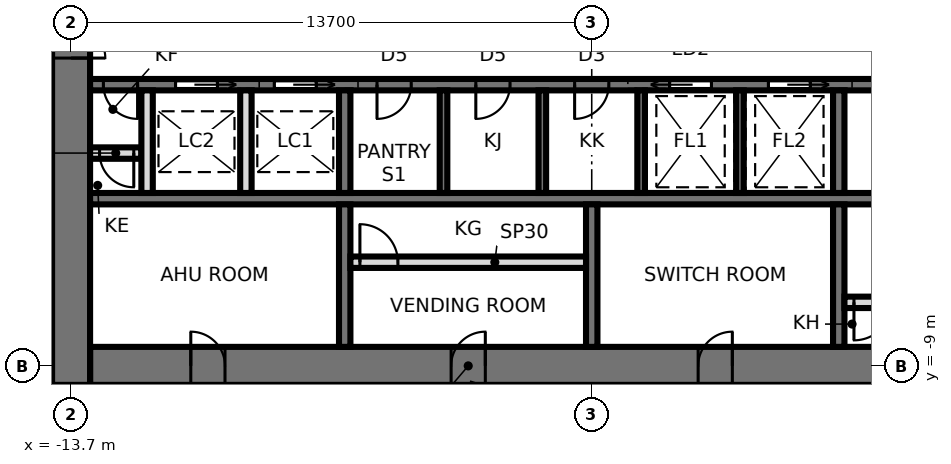
"""IFC4 building model, lengths in metres.
Left out: names, types, materials, properties, quantities, classifications, styles, units other than length and angle.
Written with IfcOpenShell. Run it as: python <this file> out.ifc"""

import sys

from ifc_helpers import new_model, si_unit, direction, frame, frame_2d, origin, place, context, subcontext, project, spatial, rectangle, extrude, element, fill, save


model = new_model("IFC4")
c1 = context("Model", 3, precision=1e-05, world=origin(), true_north=direction((0.0, 1.0)))
c2 = subcontext(c1, "Body", "Model", "MODEL_VIEW")
j1 = project(units=[si_unit("LENGTHUNIT", "METRE"), si_unit("PLANEANGLEUNIT", "RADIAN")], contexts=[c1])
p1 = place(None, origin())
s1 = spatial("IfcSite", under=j1, at=p1, CompositionType="ELEMENT")
p2 = place(p1, origin())
s2 = spatial("IfcBuilding", under=s1, at=p2, CompositionType="ELEMENT")
p3 = place(p2, frame((0.0, 0.0, 234.5)))
s3 = spatial("IfcBuildingStorey", under=s2, at=p3, CompositionType="ELEMENT", Elevation=234.5)
p4 = place(p3, frame((-13.2, -9.0, 0.0), z_axis=(0.0, 0.0, 1.0), x_axis=(1.0, 0.0, 0.0)))
e1 = element("IfcWall", 1, at=p4, inside=s3, PredefinedType="SHEAR", context=c2, shape_type="SweptSolid", body=[
    extrude(rectangle(XDim=26.4, YDim=1.0, at=frame_2d((13.2, 0.0))), origin(), (0.0, 0.0, 1.0), 3.9),
])
p5 = place(p4, frame((2.65, 0.0, 0.0)))
e2 = element("IfcOpeningElement", 2, at=p5, cuts=e1, PredefinedType="OPENING", context=c2, shape_type="SweptSolid", body=[
    extrude(rectangle(XDim=0.9, YDim=2.1, at=frame_2d((0.45, 1.05))), frame((0.0, 0.51, 0.0), z_axis=(0.0, -1.0, 0.0), x_axis=(1.0, 0.0, 0.0)), (0.0, 0.0, 1.0), 1.02),
])
p6 = place(p4, frame((9.5, 0.0, 0.0)))
e3 = element("IfcOpeningElement", 3, at=p6, cuts=e1, PredefinedType="OPENING", context=c2, shape_type="SweptSolid", body=[
    extrude(rectangle(XDim=0.9, YDim=2.1, at=frame_2d((0.45, 1.05))), frame((0.0, 0.51, 0.0), z_axis=(0.0, -1.0, 0.0), x_axis=(1.0, 0.0, 0.0)), (0.0, 0.0, 1.0), 1.02),
])
p7 = place(p4, frame((16.0, 0.0, 0.0)))
e4 = element("IfcOpeningElement", 4, at=p7, cuts=e1, PredefinedType="OPENING", context=c2, shape_type="SweptSolid", body=[
    extrude(rectangle(XDim=0.9, YDim=2.1, at=frame_2d((0.45, 1.05))), frame((0.0, 0.51, 0.0), z_axis=(0.0, -1.0, 0.0), x_axis=(1.0, 0.0, 0.0)), (0.0, 0.0, 1.0), 1.02),
])
p8 = place(p4, frame((22.85, 0.0, 0.0)))
e5 = element("IfcOpeningElement", 5, at=p8, cuts=e1, PredefinedType="OPENING", context=c2, shape_type="SweptSolid", body=[
    extrude(rectangle(XDim=0.9, YDim=2.1, at=frame_2d((0.45, 1.05))), frame((0.0, 0.51, 0.0), z_axis=(0.0, -1.0, 0.0), x_axis=(1.0, 0.0, 0.0)), (0.0, 0.0, 1.0), 1.02),
])
p9 = place(p3, frame((-13.7, 9.5, 0.0), z_axis=(0.0, 0.0, 1.0), x_axis=(0.0, -1.0, 0.0)))
e6 = element("IfcWall", 6, at=p9, inside=s3, PredefinedType="SHEAR", context=c2, shape_type="SweptSolid", body=[
    extrude(rectangle(XDim=19.0, YDim=1.0, at=frame_2d((9.5, 0.0))), origin(), (0.0, 0.0, 1.0), 3.9),
])
p10 = place(p9, frame((8.6, 0.0, 0.0)))
e7 = element("IfcOpeningElement", 7, at=p10, cuts=e6, PredefinedType="OPENING", context=c2, shape_type="SweptSolid", body=[
    extrude(rectangle(XDim=1.8, YDim=2.4, at=frame_2d((0.9, 1.2))), frame((0.0, 0.51, 0.0), z_axis=(0.0, -1.0, 0.0), x_axis=(1.0, 0.0, 0.0)), (0.0, 0.0, 1.0), 1.02),
])
p11 = place(p3, frame((-13.2, -1.6, 0.0), z_axis=(0.0, 0.0, 1.0), x_axis=(1.0, 0.0, 0.0)))
e8 = element("IfcWall", 8, at=p11, inside=s3, PredefinedType="SHEAR", context=c2, shape_type="SweptSolid", body=[
    extrude(rectangle(XDim=26.4, YDim=0.3, at=frame_2d((13.2, 0.0))), origin(), (0.0, 0.0, 1.0), 3.9),
])
p12 = place(p11, frame((25.15, 0.0, 0.0)))
e9 = element("IfcOpeningElement", 9, at=p12, cuts=e8, PredefinedType="OPENING", context=c2, shape_type="SweptSolid", body=[
    extrude(rectangle(XDim=1.0, YDim=2.1, at=frame_2d((0.5, 1.05))), frame((0.0, 0.16, 0.0), z_axis=(0.0, -1.0, 0.0), x_axis=(1.0, 0.0, 0.0)), (0.0, 0.0, 1.0), 0.32),
])
p13 = place(p11, frame((7.55, 0.0, 0.0)))
e10 = element("IfcOpeningElement", 10, at=p13, cuts=e8, PredefinedType="OPENING", context=c2, shape_type="SweptSolid", body=[
    extrude(rectangle(XDim=0.9, YDim=2.1, at=frame_2d((0.45, 1.05))), frame((0.0, 0.16, 0.0), z_axis=(0.0, -1.0, 0.0), x_axis=(1.0, 0.0, 0.0)), (0.0, 0.0, 1.0), 0.32),
])
p14 = place(p11, frame((10.15, 0.0, 0.0)))
e11 = element("IfcOpeningElement", 11, at=p14, cuts=e8, PredefinedType="OPENING", context=c2, shape_type="SweptSolid", body=[
    extrude(rectangle(XDim=0.9, YDim=2.1, at=frame_2d((0.45, 1.05))), frame((0.0, 0.16, 0.0), z_axis=(0.0, -1.0, 0.0), x_axis=(1.0, 0.0, 0.0)), (0.0, 0.0, 1.0), 0.32),
])
p15 = place(p11, frame((12.75, 0.0, 0.0)))
e12 = element("IfcOpeningElement", 12, at=p15, cuts=e8, PredefinedType="OPENING", context=c2, shape_type="SweptSolid", body=[
    extrude(rectangle(XDim=0.9, YDim=2.1, at=frame_2d((0.45, 1.05))), frame((0.0, 0.16, 0.0), z_axis=(0.0, -1.0, 0.0), x_axis=(1.0, 0.0, 0.0)), (0.0, 0.0, 1.0), 0.32),
])
p16 = place(p11, frame((15.25, 0.0, 0.0)))
e13 = element("IfcOpeningElement", 13, at=p16, cuts=e8, PredefinedType="OPENING", context=c2, shape_type="SweptSolid", body=[
    extrude(rectangle(XDim=1.1, YDim=2.3, at=frame_2d((0.55, 1.15))), frame((0.0, 0.16, 0.0), z_axis=(0.0, -1.0, 0.0), x_axis=(1.0, 0.0, 0.0)), (0.0, 0.0, 1.0), 0.32),
])
p17 = place(p11, frame((17.85, 0.0, 0.0)))
e14 = element("IfcOpeningElement", 14, at=p17, cuts=e8, PredefinedType="OPENING", context=c2, shape_type="SweptSolid", body=[
    extrude(rectangle(XDim=1.1, YDim=2.3, at=frame_2d((0.55, 1.15))), frame((0.0, 0.16, 0.0), z_axis=(0.0, -1.0, 0.0), x_axis=(1.0, 0.0, 0.0)), (0.0, 0.0, 1.0), 0.32),
])
p18 = place(p11, frame((4.85, 0.0, 0.0)))
e15 = element("IfcOpeningElement", 15, at=p18, cuts=e8, PredefinedType="OPENING", context=c2, shape_type="SweptSolid", body=[
    extrude(rectangle(XDim=1.1, YDim=2.3, at=frame_2d((0.55, 1.15))), frame((0.0, 0.16, 0.0), z_axis=(0.0, -1.0, 0.0), x_axis=(1.0, 0.0, 0.0)), (0.0, 0.0, 1.0), 0.32),
])
p19 = place(p11, frame((2.25, 0.0, 0.0)))
e16 = element("IfcOpeningElement", 16, at=p19, cuts=e8, PredefinedType="OPENING", context=c2, shape_type="SweptSolid", body=[
    extrude(rectangle(XDim=1.1, YDim=2.3, at=frame_2d((0.55, 1.15))), frame((0.0, 0.16, 0.0), z_axis=(0.0, -1.0, 0.0), x_axis=(1.0, 0.0, 0.0)), (0.0, 0.0, 1.0), 0.32),
])
p20 = place(p11, frame((0.35, 0.0, 0.0)))
e17 = element("IfcOpeningElement", 17, at=p20, cuts=e8, PredefinedType="OPENING", context=c2, shape_type="SweptSolid", body=[
    extrude(rectangle(XDim=0.9, YDim=2.1, at=frame_2d((0.45, 1.05))), frame((0.0, 0.16, 0.0), z_axis=(0.0, -1.0, 0.0), x_axis=(1.0, 0.0, 0.0)), (0.0, 0.0, 1.0), 0.32),
])
p21 = place(p3, frame((-13.2, -4.6, 0.0), z_axis=(0.0, 0.0, 1.0), x_axis=(1.0, 0.0, 0.0)))
e18 = element("IfcWall", 18, at=p21, inside=s3, PredefinedType="SHEAR", context=c2, shape_type="SweptSolid", body=[
    extrude(rectangle(XDim=26.4, YDim=0.3, at=frame_2d((13.2, 0.0))), origin(), (0.0, 0.0, 1.0), 3.9),
])
p22 = place(p3, frame((-6.5, -1.75, 0.0), z_axis=(0.0, 0.0, 1.0), x_axis=(0.0, -1.0, 0.0)))
e19 = element("IfcWall", 19, at=p22, inside=s3, PredefinedType="SHEAR", context=c2, shape_type="SweptSolid", body=[
    extrude(rectangle(XDim=2.7, YDim=0.3, at=frame_2d((1.35, 0.0))), origin(), (0.0, 0.0, 1.0), 3.9),
])
p23 = place(p3, frame((-6.5, -4.75, 0.0), z_axis=(0.0, 0.0, 1.0), x_axis=(0.0, -1.0, 0.0)))
e20 = element("IfcWall", 20, at=p23, inside=s3, PredefinedType="SHEAR", context=c2, shape_type="SweptSolid", body=[
    extrude(rectangle(XDim=3.75, YDim=0.3, at=frame_2d((1.875, 0.0))), origin(), (0.0, 0.0, 1.0), 3.9),
])
p24 = place(p3, frame((6.5, -1.75, 0.0), z_axis=(0.0, 0.0, 1.0), x_axis=(0.0, -1.0, 0.0)))
e21 = element("IfcWall", 21, at=p24, inside=s3, PredefinedType="SHEAR", context=c2, shape_type="SweptSolid", body=[
    extrude(rectangle(XDim=2.7, YDim=0.3, at=frame_2d((1.35, 0.0))), origin(), (0.0, 0.0, 1.0), 3.9),
])
p25 = place(p3, frame((6.5, -4.75, 0.0), z_axis=(0.0, 0.0, 1.0), x_axis=(0.0, -1.0, 0.0)))
e22 = element("IfcWall", 22, at=p25, inside=s3, PredefinedType="SHEAR", context=c2, shape_type="SweptSolid", body=[
    extrude(rectangle(XDim=3.75, YDim=0.3, at=frame_2d((1.875, 0.0))), origin(), (0.0, 0.0, 1.0), 3.9),
])
for number, where, z_axis, x_axis in (
    (23, (-3.9, -1.75, 0.0), (0.0, 0.0, 1.0), (0.0, -1.0, 0.0)),
    (24, (-1.3, -1.75, 0.0), (0.0, 0.0, 1.0), (0.0, -1.0, 0.0)),
    (25, (1.3, -1.75, 0.0), (0.0, 0.0, 1.0), (0.0, -1.0, 0.0)),
    (26, (3.9, -1.75, 0.0), (0.0, 0.0, 1.0), (0.0, -1.0, 0.0)),
):
    element("IfcWall", number, at=place(p3, frame(where, z_axis=z_axis, x_axis=x_axis)), inside=s3, PredefinedType="SHEAR", context=c2, shape_type="SweptSolid", body=[
        extrude(rectangle(XDim=2.7, YDim=0.2, at=frame_2d((1.35, 0.0))), origin(), (0.0, 0.0, 1.0), 3.9),
    ])
p26 = place(p3, frame((0.0, -4.75, 0.0), z_axis=(0.0, 0.0, 1.0), x_axis=(0.0, -1.0, 0.0)))
e27 = element("IfcWall", 27, at=p26, inside=s3, PredefinedType="SHEAR", context=c2, shape_type="SweptSolid", body=[
    extrude(rectangle(XDim=3.75, YDim=0.3, at=frame_2d((1.875, 0.0))), origin(), (0.0, 0.0, 1.0), 3.9),
])
p27 = place(p3, frame((-6.35, -6.272, 0.0), z_axis=(0.0, 0.0, 1.0), x_axis=(1.0, 0.0, 0.0)))
e28 = element("IfcWall", 28, at=p27, inside=s3, PredefinedType="PARTITIONING", context=c2, shape_type="SweptSolid", body=[
    extrude(rectangle(XDim=6.2, YDim=0.3, at=frame_2d((3.1, 0.0))), origin(), (0.0, 0.0, 1.0), 3.74),
])
p28 = place(p27, frame((0.25, 0.0, 0.0)))
e29 = element("IfcOpeningElement", 29, at=p28, cuts=e28, PredefinedType="OPENING", context=c2, shape_type="SweptSolid", body=[
    extrude(rectangle(XDim=1.0, YDim=2.4, at=frame_2d((0.5, 1.2))), frame((0.0, 0.16, 0.0), z_axis=(0.0, -1.0, 0.0), x_axis=(1.0, 0.0, 0.0)), (0.0, 0.0, 1.0), 0.32),
])
p29 = place(p3, frame((6.65, -7.328, 0.0), z_axis=(0.0, 0.0, 1.0), x_axis=(1.0, 0.0, 0.0)))
e30 = element("IfcWall", 30, at=p29, inside=s3, PredefinedType="PARTITIONING", context=c2, shape_type="SweptSolid", body=[
    extrude(rectangle(XDim=6.55, YDim=0.3, at=frame_2d((3.275, 0.0))), origin(), (0.0, 0.0, 1.0), 3.74),
])
p30 = place(p29, frame((0.25, 0.0, 0.0)))
e31 = element("IfcOpeningElement", 31, at=p30, cuts=e30, PredefinedType="OPENING", context=c2, shape_type="SweptSolid", body=[
    extrude(rectangle(XDim=1.0, YDim=2.4, at=frame_2d((0.5, 1.2))), frame((0.0, 0.16, 0.0), z_axis=(0.0, -1.0, 0.0), x_axis=(1.0, 0.0, 0.0)), (0.0, 0.0, 1.0), 0.32),
])
p31 = place(p3, frame((-13.2, -3.4, 0.0), z_axis=(0.0, 0.0, 1.0), x_axis=(1.0, 0.0, 0.0)))
e32 = element("IfcWall", 32, at=p31, inside=s3, PredefinedType="SOLIDWALL", context=c2, shape_type="SweptSolid", body=[
    extrude(rectangle(XDim=1.35, YDim=0.3, at=frame_2d((0.675, 0.0))), origin(), (0.0, 0.0, 1.0), 3.74),
])
p32 = place(p31, frame((0.25, 0.0, 0.0)))
e33 = element("IfcOpeningElement", 33, at=p32, cuts=e32, PredefinedType="OPENING", context=c2, shape_type="SweptSolid", body=[
    extrude(rectangle(XDim=0.9, YDim=2.1, at=frame_2d((0.45, 1.05))), frame((0.0, 0.16, 0.0), z_axis=(0.0, -1.0, 0.0), x_axis=(1.0, 0.0, 0.0)), (0.0, 0.0, 1.0), 0.32),
])
for number, where, z_axis, x_axis in (
    (34, (-9.1, -1.75, 0.0), (0.0, 0.0, 1.0), (0.0, -1.0, 0.0)),
    (35, (-11.7, -1.75, 0.0), (0.0, 0.0, 1.0), (0.0, -1.0, 0.0)),
):
    element("IfcWall", number, at=place(p3, frame(where, z_axis=z_axis, x_axis=x_axis)), inside=s3, PredefinedType="SOLIDWALL", context=c2, shape_type="SweptSolid", body=[
        extrude(rectangle(XDim=2.7, YDim=0.3, at=frame_2d((1.35, 0.0))), origin(), (0.0, 0.0, 1.0), 3.74),
    ])
p33 = place(p3, frame((-3.672, -11.3, 0.0), z_axis=(0.0, 0.0, 1.0), x_axis=(0.309059822154, 0.95104259964, 0.0)))
e36 = element("IfcWall", 36, at=p33, inside=s3, PredefinedType="PARTITIONING", context=c2, shape_type="SweptSolid", body=[
    extrude(rectangle(XDim=1.893, YDim=0.12, at=frame_2d((0.946, 0.0))), origin(), (0.0, 0.0, 1.0), 3.04),
])
p34 = place(p10, origin())
e37 = element("IfcDoor", 37, at=p34, inside=s3, OperationType="DOUBLE_DOOR_SINGLE_SWING", PredefinedType="DOOR", context=c2, shape_type="SweptSolid", body=[
    extrude(rectangle(XDim=1.72, YDim=2.36, at=frame_2d((0.9, 1.18))), frame((0.0, 0.025, 0.0), z_axis=(0.0, -1.0, 0.0), x_axis=(1.0, 0.0, 0.0)), (0.0, 0.0, 1.0), 0.05),
    extrude(rectangle(XDim=0.04, YDim=2.4, at=frame_2d((0.02, 1.2))), frame((0.0, 0.25, 0.0), z_axis=(0.0, -1.0, 0.0), x_axis=(1.0, 0.0, 0.0)), (0.0, 0.0, 1.0), 0.5),
    extrude(rectangle(XDim=0.04, YDim=2.4, at=frame_2d((1.78, 1.2))), frame((0.0, 0.25, 0.0), z_axis=(0.0, -1.0, 0.0), x_axis=(1.0, 0.0, 0.0)), (0.0, 0.0, 1.0), 0.5),
    extrude(rectangle(XDim=1.72, YDim=0.04, at=frame_2d((0.9, 2.38))), frame((0.0, 0.25, 0.0), z_axis=(0.0, -1.0, 0.0), x_axis=(1.0, 0.0, 0.0)), (0.0, 0.0, 1.0), 0.5),
])
fill(e7, e37)
p35 = place(p13, frame((0.9, 0.0, 0.0), z_axis=(0.0, 0.0, 1.0), x_axis=(-1.0, 0.0, 0.0)))
e38 = element("IfcDoor", 38, at=p35, inside=s3, OperationType="SINGLE_SWING_RIGHT", PredefinedType="DOOR", context=c2, shape_type="SweptSolid", body=[
    extrude(rectangle(XDim=0.9, YDim=2.1, at=frame_2d((0.45, 1.05))), frame((0.0, 0.025, 0.0), z_axis=(0.0, -1.0, 0.0), x_axis=(1.0, 0.0, 0.0)), (0.0, 0.0, 1.0), 0.05),
])
fill(e10, e38)
p36 = place(p14, frame((0.9, 0.0, 0.0), z_axis=(0.0, 0.0, 1.0), x_axis=(-1.0, 0.0, 0.0)))
e39 = element("IfcDoor", 39, at=p36, inside=s3, OperationType="SINGLE_SWING_RIGHT", PredefinedType="DOOR", context=c2, shape_type="SweptSolid", body=[
    extrude(rectangle(XDim=0.9, YDim=2.1, at=frame_2d((0.45, 1.05))), frame((0.0, 0.025, 0.0), z_axis=(0.0, -1.0, 0.0), x_axis=(1.0, 0.0, 0.0)), (0.0, 0.0, 1.0), 0.05),
])
fill(e11, e39)
p37 = place(p15, frame((0.9, 0.0, 0.0), z_axis=(0.0, 0.0, 1.0), x_axis=(-1.0, 0.0, 0.0)))
e40 = element("IfcDoor", 40, at=p37, inside=s3, OperationType="SINGLE_SWING_RIGHT", PredefinedType="DOOR", context=c2, shape_type="SweptSolid", body=[
    extrude(rectangle(XDim=0.9, YDim=2.1, at=frame_2d((0.45, 1.05))), frame((0.0, 0.025, 0.0), z_axis=(0.0, -1.0, 0.0), x_axis=(1.0, 0.0, 0.0)), (0.0, 0.0, 1.0), 0.05),
])
fill(e12, e40)
p38 = place(p16, frame((1.1, 0.0, 0.0), z_axis=(0.0, 0.0, 1.0), x_axis=(-1.0, 0.0, 0.0)))
e41 = element("IfcDoor", 41, at=p38, inside=s3, OperationType="SLIDING_TO_RIGHT", PredefinedType="DOOR", context=c2, shape_type="SweptSolid", body=[
    extrude(rectangle(XDim=1.1, YDim=2.3, at=frame_2d((0.55, 1.15))), frame((0.0, 0.025, 0.0), z_axis=(0.0, -1.0, 0.0), x_axis=(1.0, 0.0, 0.0)), (0.0, 0.0, 1.0), 0.05),
])
fill(e13, e41)
p39 = place(p17, frame((1.1, 0.0, 0.0), z_axis=(0.0, 0.0, 1.0), x_axis=(-1.0, 0.0, 0.0)))
e42 = element("IfcDoor", 42, at=p39, inside=s3, OperationType="SLIDING_TO_LEFT", PredefinedType="DOOR", context=c2, shape_type="SweptSolid", body=[
    extrude(rectangle(XDim=1.1, YDim=2.3, at=frame_2d((0.55, 1.15))), frame((0.0, 0.025, 0.0), z_axis=(0.0, -1.0, 0.0), x_axis=(1.0, 0.0, 0.0)), (0.0, 0.0, 1.0), 0.05),
])
fill(e14, e42)
p40 = place(p18, frame((1.1, 0.0, 0.0), z_axis=(0.0, 0.0, 1.0), x_axis=(-1.0, 0.0, 0.0)))
e43 = element("IfcDoor", 43, at=p40, inside=s3, OperationType="SLIDING_TO_LEFT", PredefinedType="DOOR", context=c2, shape_type="SweptSolid", body=[
    extrude(rectangle(XDim=1.1, YDim=2.3, at=frame_2d((0.55, 1.15))), frame((0.0, 0.025, 0.0), z_axis=(0.0, -1.0, 0.0), x_axis=(1.0, 0.0, 0.0)), (0.0, 0.0, 1.0), 0.05),
])
fill(e15, e43)
p41 = place(p19, frame((1.1, 0.0, 0.0), z_axis=(0.0, 0.0, 1.0), x_axis=(-1.0, 0.0, 0.0)))
e44 = element("IfcDoor", 44, at=p41, inside=s3, OperationType="SLIDING_TO_LEFT", PredefinedType="DOOR", context=c2, shape_type="SweptSolid", body=[
    extrude(rectangle(XDim=1.1, YDim=2.3, at=frame_2d((0.55, 1.15))), frame((0.0, 0.025, 0.0), z_axis=(0.0, -1.0, 0.0), x_axis=(1.0, 0.0, 0.0)), (0.0, 0.0, 1.0), 0.05),
])
fill(e16, e44)
p42 = place(p20, frame((0.9, 0.0, 0.0), z_axis=(0.0, 0.0, 1.0), x_axis=(-1.0, 0.0, 0.0)))
e45 = element("IfcDoor", 45, at=p42, inside=s3, OperationType="SINGLE_SWING_LEFT", PredefinedType="DOOR", context=c2, shape_type="SweptSolid", body=[
    extrude(rectangle(XDim=0.9, YDim=2.1, at=frame_2d((0.45, 1.05))), frame((0.0, 0.025, 0.0), z_axis=(0.0, -1.0, 0.0), x_axis=(1.0, 0.0, 0.0)), (0.0, 0.0, 1.0), 0.05),
])
fill(e17, e45)
p43 = place(p5, origin())
e46 = element("IfcDoor", 46, at=p43, inside=s3, OperationType="SINGLE_SWING_LEFT", PredefinedType="DOOR", context=c2, shape_type="SweptSolid", body=[
    extrude(rectangle(XDim=0.82, YDim=2.06, at=frame_2d((0.45, 1.03))), frame((0.0, 0.025, 0.0), z_axis=(0.0, -1.0, 0.0), x_axis=(1.0, 0.0, 0.0)), (0.0, 0.0, 1.0), 0.05),
    extrude(rectangle(XDim=0.04, YDim=2.1, at=frame_2d((0.02, 1.05))), frame((0.0, 0.25, 0.0), z_axis=(0.0, -1.0, 0.0), x_axis=(1.0, 0.0, 0.0)), (0.0, 0.0, 1.0), 0.5),
    extrude(rectangle(XDim=0.04, YDim=2.1, at=frame_2d((0.88, 1.05))), frame((0.0, 0.25, 0.0), z_axis=(0.0, -1.0, 0.0), x_axis=(1.0, 0.0, 0.0)), (0.0, 0.0, 1.0), 0.5),
    extrude(rectangle(XDim=0.82, YDim=0.04, at=frame_2d((0.45, 2.08))), frame((0.0, 0.25, 0.0), z_axis=(0.0, -1.0, 0.0), x_axis=(1.0, 0.0, 0.0)), (0.0, 0.0, 1.0), 0.5),
])
fill(e2, e46)
p44 = place(p6, origin())
e47 = element("IfcDoor", 47, at=p44, inside=s3, OperationType="SINGLE_SWING_RIGHT", PredefinedType="DOOR", context=c2, shape_type="SweptSolid", body=[
    extrude(rectangle(XDim=0.82, YDim=2.06, at=frame_2d((0.45, 1.03))), frame((0.0, 0.025, 0.0), z_axis=(0.0, -1.0, 0.0), x_axis=(1.0, 0.0, 0.0)), (0.0, 0.0, 1.0), 0.05),
    extrude(rectangle(XDim=0.04, YDim=2.1, at=frame_2d((0.02, 1.05))), frame((0.0, 0.25, 0.0), z_axis=(0.0, -1.0, 0.0), x_axis=(1.0, 0.0, 0.0)), (0.0, 0.0, 1.0), 0.5),
    extrude(rectangle(XDim=0.04, YDim=2.1, at=frame_2d((0.88, 1.05))), frame((0.0, 0.25, 0.0), z_axis=(0.0, -1.0, 0.0), x_axis=(1.0, 0.0, 0.0)), (0.0, 0.0, 1.0), 0.5),
    extrude(rectangle(XDim=0.82, YDim=0.04, at=frame_2d((0.45, 2.08))), frame((0.0, 0.25, 0.0), z_axis=(0.0, -1.0, 0.0), x_axis=(1.0, 0.0, 0.0)), (0.0, 0.0, 1.0), 0.5),
])
fill(e3, e47)
p45 = place(p7, origin())
e48 = element("IfcDoor", 48, at=p45, inside=s3, OperationType="SINGLE_SWING_RIGHT", PredefinedType="DOOR", context=c2, shape_type="SweptSolid", body=[
    extrude(rectangle(XDim=0.82, YDim=2.06, at=frame_2d((0.45, 1.03))), frame((0.0, 0.025, 0.0), z_axis=(0.0, -1.0, 0.0), x_axis=(1.0, 0.0, 0.0)), (0.0, 0.0, 1.0), 0.05),
    extrude(rectangle(XDim=0.04, YDim=2.1, at=frame_2d((0.02, 1.05))), frame((0.0, 0.25, 0.0), z_axis=(0.0, -1.0, 0.0), x_axis=(1.0, 0.0, 0.0)), (0.0, 0.0, 1.0), 0.5),
    extrude(rectangle(XDim=0.04, YDim=2.1, at=frame_2d((0.88, 1.05))), frame((0.0, 0.25, 0.0), z_axis=(0.0, -1.0, 0.0), x_axis=(1.0, 0.0, 0.0)), (0.0, 0.0, 1.0), 0.5),
    extrude(rectangle(XDim=0.82, YDim=0.04, at=frame_2d((0.45, 2.08))), frame((0.0, 0.25, 0.0), z_axis=(0.0, -1.0, 0.0), x_axis=(1.0, 0.0, 0.0)), (0.0, 0.0, 1.0), 0.5),
])
fill(e4, e48)
p46 = place(p28, origin())
e49 = element("IfcDoor", 49, at=p46, inside=s3, OperationType="SINGLE_SWING_LEFT", PredefinedType="DOOR", context=c2, shape_type="SweptSolid", body=[
    extrude(rectangle(XDim=1.0, YDim=2.4, at=frame_2d((0.5, 1.2))), frame((0.0, 0.025, 0.0), z_axis=(0.0, -1.0, 0.0), x_axis=(1.0, 0.0, 0.0)), (0.0, 0.0, 1.0), 0.05),
])
fill(e29, e49)
p47 = place(p30, frame((1.0, 0.0, 0.0), z_axis=(0.0, 0.0, 1.0), x_axis=(-1.0, 0.0, 0.0)))
e50 = element("IfcDoor", 50, at=p47, inside=s3, OperationType="SINGLE_SWING_RIGHT", PredefinedType="DOOR", context=c2, shape_type="SweptSolid", body=[
    extrude(rectangle(XDim=1.0, YDim=2.4, at=frame_2d((0.5, 1.2))), frame((0.0, 0.025, 0.0), z_axis=(0.0, -1.0, 0.0), x_axis=(1.0, 0.0, 0.0)), (0.0, 0.0, 1.0), 0.05),
])
fill(e31, e50)
p48 = place(p32, frame((0.9, 0.0, 0.0), z_axis=(0.0, 0.0, 1.0), x_axis=(-1.0, 0.0, 0.0)))
e51 = element("IfcDoor", 51, at=p48, inside=s3, OperationType="SINGLE_SWING_LEFT", PredefinedType="DOOR", context=c2, shape_type="SweptSolid", body=[
    extrude(rectangle(XDim=0.9, YDim=2.1, at=frame_2d((0.45, 1.05))), frame((0.0, 0.025, 0.0), z_axis=(0.0, -1.0, 0.0), x_axis=(1.0, 0.0, 0.0)), (0.0, 0.0, 1.0), 0.05),
])
fill(e33, e51)
save(model, sys.argv[1])
